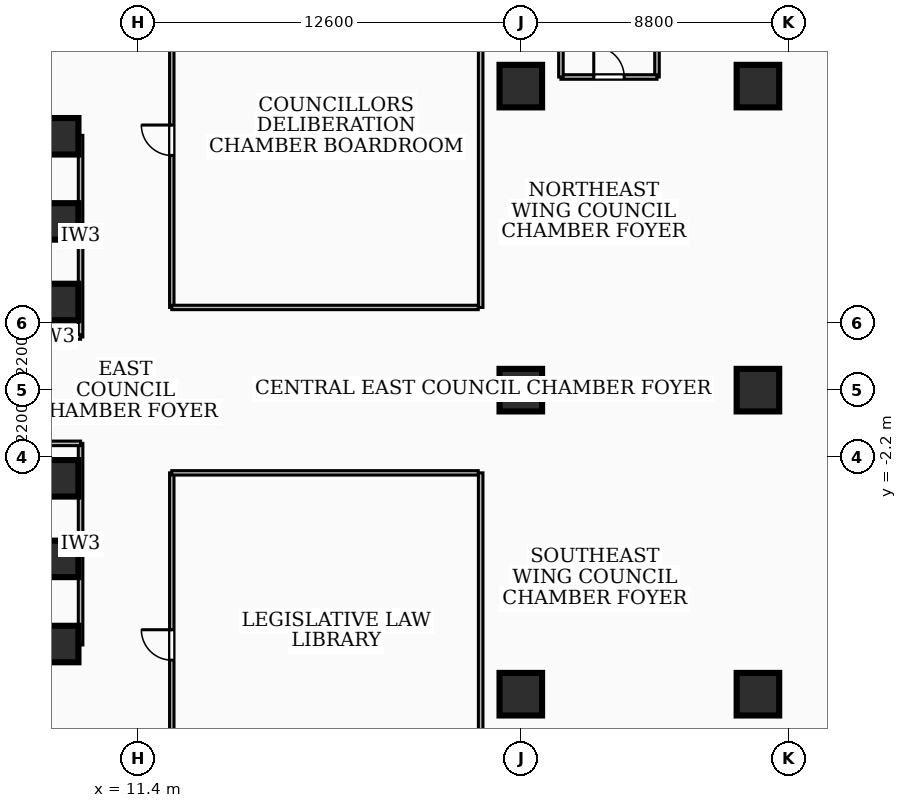
"""IFC4 building model, lengths in metres.
Left out: names, types, materials, properties, quantities, classifications, styles, units other than length and angle.
Written with IfcOpenShell. Run it as: python <this file> out.ifc"""

import sys

from ifc_helpers import new_model, si_unit, direction, frame, frame_2d, origin, origin_2d, place, context, subcontext, project, spatial, rectangle, extrude, element, fill, save


model = new_model("IFC4")
c1 = context("Model", 3, precision=1e-05, world=origin(), true_north=direction((0.0, 1.0)))
c2 = subcontext(c1, "Body", "Model", "MODEL_VIEW")
j1 = project(units=[si_unit("LENGTHUNIT", "METRE"), si_unit("PLANEANGLEUNIT", "RADIAN")], contexts=[c1])
p1 = place(None, origin())
s1 = spatial("IfcSite", under=j1, at=p1, CompositionType="ELEMENT")
p2 = place(p1, origin())
s2 = spatial("IfcBuilding", under=s1, at=p2, CompositionType="ELEMENT")
p3 = place(p2, frame((0.0, 0.0, 10.08)))
s3 = spatial("IfcBuildingStorey", under=s2, at=p3, CompositionType="ELEMENT", Elevation=10.08)
for number, where, z_axis, x_axis in (
    (1, (-8.78, 8.585, 0.0), (0.0, 0.0, 1.0), (1.0, 0.0, 0.0)),
    (2, (8.78, -8.585, 0.0), (0.0, 0.0, 1.0), (-1.0, 0.0, 0.0)),
):
    element("IfcWall", number, at=place(p3, frame(where, z_axis=z_axis, x_axis=x_axis)), inside=s3, PredefinedType="SHEAR", context=c2, shape_type="SweptSolid", body=[
        extrude(rectangle(XDim=17.56, YDim=0.55, at=frame_2d((8.78, 0.0))), origin(), (0.0, 0.0, 1.0), 4.36),
    ])
for number, where, z_axis, x_axis in (
    (3, (8.85, -5.55, 0.0), (0.0, 0.0, 1.0), (1.0, 0.0, 0.0)),
    (4, (8.85, -2.9, 0.0), (0.0, 0.0, 1.0), (1.0, 0.0, 0.0)),
    (5, (8.85, 2.9, 0.0), (0.0, 0.0, 1.0), (1.0, 0.0, 0.0)),
    (6, (8.85, 5.55, 0.0), (0.0, 0.0, 1.0), (1.0, 0.0, 0.0)),
    (7, (8.85, -8.35, 0.0), (0.0, 0.0, 1.0), (1.0, 0.0, 0.0)),
    (8, (8.85, 8.35, 0.0), (0.0, 0.0, 1.0), (1.0, 0.0, 0.0)),
):
    element("IfcColumn", number, at=place(p3, frame(where, z_axis=z_axis, x_axis=x_axis)), inside=s3, PredefinedType="COLUMN", context=c2, shape_type="SweptSolid", body=[
        extrude(rectangle(XDim=1.2, YDim=1.2, at=origin_2d()), origin(), (0.0, 0.0, 1.0), 4.68),
    ])
for number, where, z_axis, x_axis in (
    (9, (31.8, -10.0, 0.0), (0.0, 0.0, 1.0), (1.0, 0.0, 0.0)),
    (10, (31.8, 0.0, 0.0), (0.0, 0.0, 1.0), (1.0, 0.0, 0.0)),
    (11, (31.8, 10.0, 0.0), (0.0, 0.0, 1.0), (1.0, 0.0, 0.0)),
    (12, (24.0, -10.0, 0.0), (0.0, 0.0, 1.0), (1.0, 0.0, 0.0)),
    (13, (24.0, 0.0, 0.0), (0.0, 0.0, 1.0), (1.0, 0.0, 0.0)),
    (14, (24.0, 10.0, 0.0), (0.0, 0.0, 1.0), (1.0, 0.0, 0.0)),
):
    element("IfcColumn", number, at=place(p3, frame(where, z_axis=z_axis, x_axis=x_axis)), inside=s3, PredefinedType="COLUMN", context=c2, shape_type="SweptSolid", body=[
        extrude(rectangle(XDim=1.4, YDim=1.4, at=origin_2d()), origin(), (0.0, 0.0, 1.0), 4.68),
    ])
for number, where, z_axis, x_axis in (
    (15, (25.32, 10.3, 0.0), (0.0, 0.0, 1.0), (0.0, 1.0, 0.0)),
    (16, (28.48, 10.3, 0.0), (0.0, 0.0, 1.0), (0.0, 1.0, 0.0)),
):
    element("IfcWall", number, at=place(p3, frame(where, z_axis=z_axis, x_axis=x_axis)), inside=s3, PredefinedType="PARTITIONING", context=c2, shape_type="SweptSolid", body=[
        extrude(rectangle(XDim=9.8, YDim=0.15, at=frame_2d((4.9, 0.0))), origin(), (0.0, 0.0, 1.0), 4.36),
    ])
p4 = place(p3, frame((25.32, 10.3, 0.0), z_axis=(0.0, 0.0, 1.0), x_axis=(1.0, 0.0, 0.0)))
e17 = element("IfcWall", 17, at=p4, inside=s3, PredefinedType="PARTITIONING", context=c2, shape_type="SweptSolid", body=[
    extrude(rectangle(XDim=3.16, YDim=0.15, at=frame_2d((1.58, 0.0))), origin(), (0.0, 0.0, 1.0), 3.37),
])
p5 = place(p4, frame((1.08, 0.0, 0.0)))
e18 = element("IfcOpeningElement", 18, at=p5, cuts=e17, PredefinedType="OPENING", context=c2, shape_type="SweptSolid", body=[
    extrude(rectangle(XDim=1.0, YDim=2.1, at=frame_2d((0.5, 1.05))), frame((0.0, 0.085, 0.0), z_axis=(0.0, -1.0, 0.0), x_axis=(1.0, 0.0, 0.0)), (0.0, 0.0, 1.0), 0.17),
])
p6 = place(p3, frame((9.52, 1.75, 0.0), z_axis=(0.0, 0.0, 1.0), x_axis=(0.0, 1.0, 0.0)))
e19 = element("IfcWall", 19, at=p6, inside=s3, PredefinedType="PARTITIONING", context=c2, shape_type="SweptSolid", body=[
    extrude(rectangle(XDim=6.63, YDim=0.15, at=frame_2d((3.315, 0.0))), origin(), (0.0, 0.0, 1.0), 3.37),
])
p7 = place(p3, frame((7.85, 1.75, 0.0), z_axis=(0.0, 0.0, 1.0), x_axis=(1.0, 0.0, 0.0)))
e20 = element("IfcWall", 20, at=p7, inside=s3, PredefinedType="PARTITIONING", context=c2, shape_type="SweptSolid", body=[
    extrude(rectangle(XDim=1.67, YDim=0.15, at=frame_2d((0.835, 0.0))), origin(), (0.0, 0.0, 1.0), 3.425),
])
p8 = place(p3, frame((9.52, -8.38, 0.0), z_axis=(0.0, 0.0, 1.0), x_axis=(0.0, 1.0, 0.0)))
e21 = element("IfcWall", 21, at=p8, inside=s3, PredefinedType="PARTITIONING", context=c2, shape_type="SweptSolid", body=[
    extrude(rectangle(XDim=6.63, YDim=0.15, at=frame_2d((3.315, 0.0))), origin(), (0.0, 0.0, 1.0), 3.37),
])
p9 = place(p3, frame((7.85, -1.75, 0.0), z_axis=(0.0, 0.0, 1.0), x_axis=(1.0, 0.0, 0.0)))
e22 = element("IfcWall", 22, at=p9, inside=s3, PredefinedType="PARTITIONING", context=c2, shape_type="SweptSolid", body=[
    extrude(rectangle(XDim=1.67, YDim=0.15, at=frame_2d((0.835, 0.0))), origin(), (0.0, 0.0, 1.0), 3.425),
])
p10 = place(p3, frame((12.52, 2.72, 0.0), z_axis=(0.0, 0.0, 1.0), x_axis=(0.0, 1.0, 0.0)))
e23 = element("IfcWall", 23, at=p10, inside=s3, PredefinedType="PARTITIONING", context=c2, shape_type="SweptSolid", body=[
    extrude(rectangle(XDim=11.16, YDim=0.145, at=frame_2d((5.58, 0.0))), origin(), (0.0, 0.0, 1.0), 3.37),
])
p11 = place(p10, frame((5.0, 0.0, 0.0)))
e24 = element("IfcOpeningElement", 24, at=p11, cuts=e23, PredefinedType="OPENING", context=c2, shape_type="SweptSolid", body=[
    extrude(rectangle(XDim=1.0, YDim=2.1, at=frame_2d((0.5, 1.05))), frame((0.0, 0.083, 0.0), z_axis=(0.0, -1.0, 0.0), x_axis=(1.0, 0.0, 0.0)), (0.0, 0.0, 1.0), 0.165),
])
p12 = place(p3, frame((12.52, 2.72, 0.0), z_axis=(0.0, 0.0, 1.0), x_axis=(1.0, 0.0, 0.0)))
e25 = element("IfcWall", 25, at=p12, inside=s3, PredefinedType="PARTITIONING", context=c2, shape_type="SweptSolid", body=[
    extrude(rectangle(XDim=10.08, YDim=0.145, at=frame_2d((5.04, 0.0))), origin(), (0.0, 0.0, 1.0), 4.36),
])
p13 = place(p3, frame((22.68, 2.72, 0.0), z_axis=(0.0, 0.0, 1.0), x_axis=(0.0, 1.0, 0.0)))
e26 = element("IfcWall", 26, at=p13, inside=s3, PredefinedType="PARTITIONING", context=c2, shape_type="SweptSolid", body=[
    extrude(rectangle(XDim=11.16, YDim=0.15, at=frame_2d((5.58, 0.0))), origin(), (0.0, 0.0, 1.0), 3.37),
])
p14 = place(p3, frame((12.52, -13.88, 0.0), z_axis=(0.0, 0.0, 1.0), x_axis=(0.0, 1.0, 0.0)))
e27 = element("IfcWall", 27, at=p14, inside=s3, PredefinedType="PARTITIONING", context=c2, shape_type="SweptSolid", body=[
    extrude(rectangle(XDim=11.16, YDim=0.145, at=frame_2d((5.58, 0.0))), origin(), (0.0, 0.0, 1.0), 3.37),
])
p15 = place(p14, frame((5.0, 0.0, 0.0)))
e28 = element("IfcOpeningElement", 28, at=p15, cuts=e27, PredefinedType="OPENING", context=c2, shape_type="SweptSolid", body=[
    extrude(rectangle(XDim=1.0, YDim=2.1, at=frame_2d((0.5, 1.05))), frame((0.0, 0.083, 0.0), z_axis=(0.0, -1.0, 0.0), x_axis=(1.0, 0.0, 0.0)), (0.0, 0.0, 1.0), 0.165),
])
p16 = place(p3, frame((12.52, -2.72, 0.0), z_axis=(0.0, 0.0, 1.0), x_axis=(1.0, 0.0, 0.0)))
e29 = element("IfcWall", 29, at=p16, inside=s3, PredefinedType="PARTITIONING", context=c2, shape_type="SweptSolid", body=[
    extrude(rectangle(XDim=10.08, YDim=0.145, at=frame_2d((5.04, 0.0))), origin(), (0.0, 0.0, 1.0), 4.36),
])
p17 = place(p3, frame((22.68, -13.88, 0.0), z_axis=(0.0, 0.0, 1.0), x_axis=(0.0, 1.0, 0.0)))
e30 = element("IfcWall", 30, at=p17, inside=s3, PredefinedType="PARTITIONING", context=c2, shape_type="SweptSolid", body=[
    extrude(rectangle(XDim=11.16, YDim=0.15, at=frame_2d((5.58, 0.0))), origin(), (0.0, 0.0, 1.0), 3.37),
])
p18 = place(p5, origin())
e31 = element("IfcDoor", 31, at=p18, inside=s3, OperationType="SINGLE_SWING_LEFT", PredefinedType="DOOR", context=c2, shape_type="SweptSolid", body=[
    extrude(rectangle(XDim=1.0, YDim=2.1, at=frame_2d((0.5, 1.05))), frame((0.0, 0.025, 0.0), z_axis=(0.0, -1.0, 0.0), x_axis=(1.0, 0.0, 0.0)), (0.0, 0.0, 1.0), 0.05),
])
fill(e18, e31)
p19 = place(p11, origin())
e32 = element("IfcDoor", 32, at=p19, inside=s3, OperationType="SINGLE_SWING_RIGHT", PredefinedType="DOOR", context=c2, shape_type="SweptSolid", body=[
    extrude(rectangle(XDim=1.0, YDim=2.1, at=frame_2d((0.5, 1.05))), frame((0.0, 0.025, 0.0), z_axis=(0.0, -1.0, 0.0), x_axis=(1.0, 0.0, 0.0)), (0.0, 0.0, 1.0), 0.05),
])
fill(e24, e32)
p20 = place(p15, origin())
e33 = element("IfcDoor", 33, at=p20, inside=s3, OperationType="SINGLE_SWING_RIGHT", PredefinedType="DOOR", context=c2, shape_type="SweptSolid", body=[
    extrude(rectangle(XDim=1.0, YDim=2.1, at=frame_2d((0.5, 1.05))), frame((0.0, 0.025, 0.0), z_axis=(0.0, -1.0, 0.0), x_axis=(1.0, 0.0, 0.0)), (0.0, 0.0, 1.0), 0.05),
])
fill(e28, e33)
save(model, sys.argv[1])
